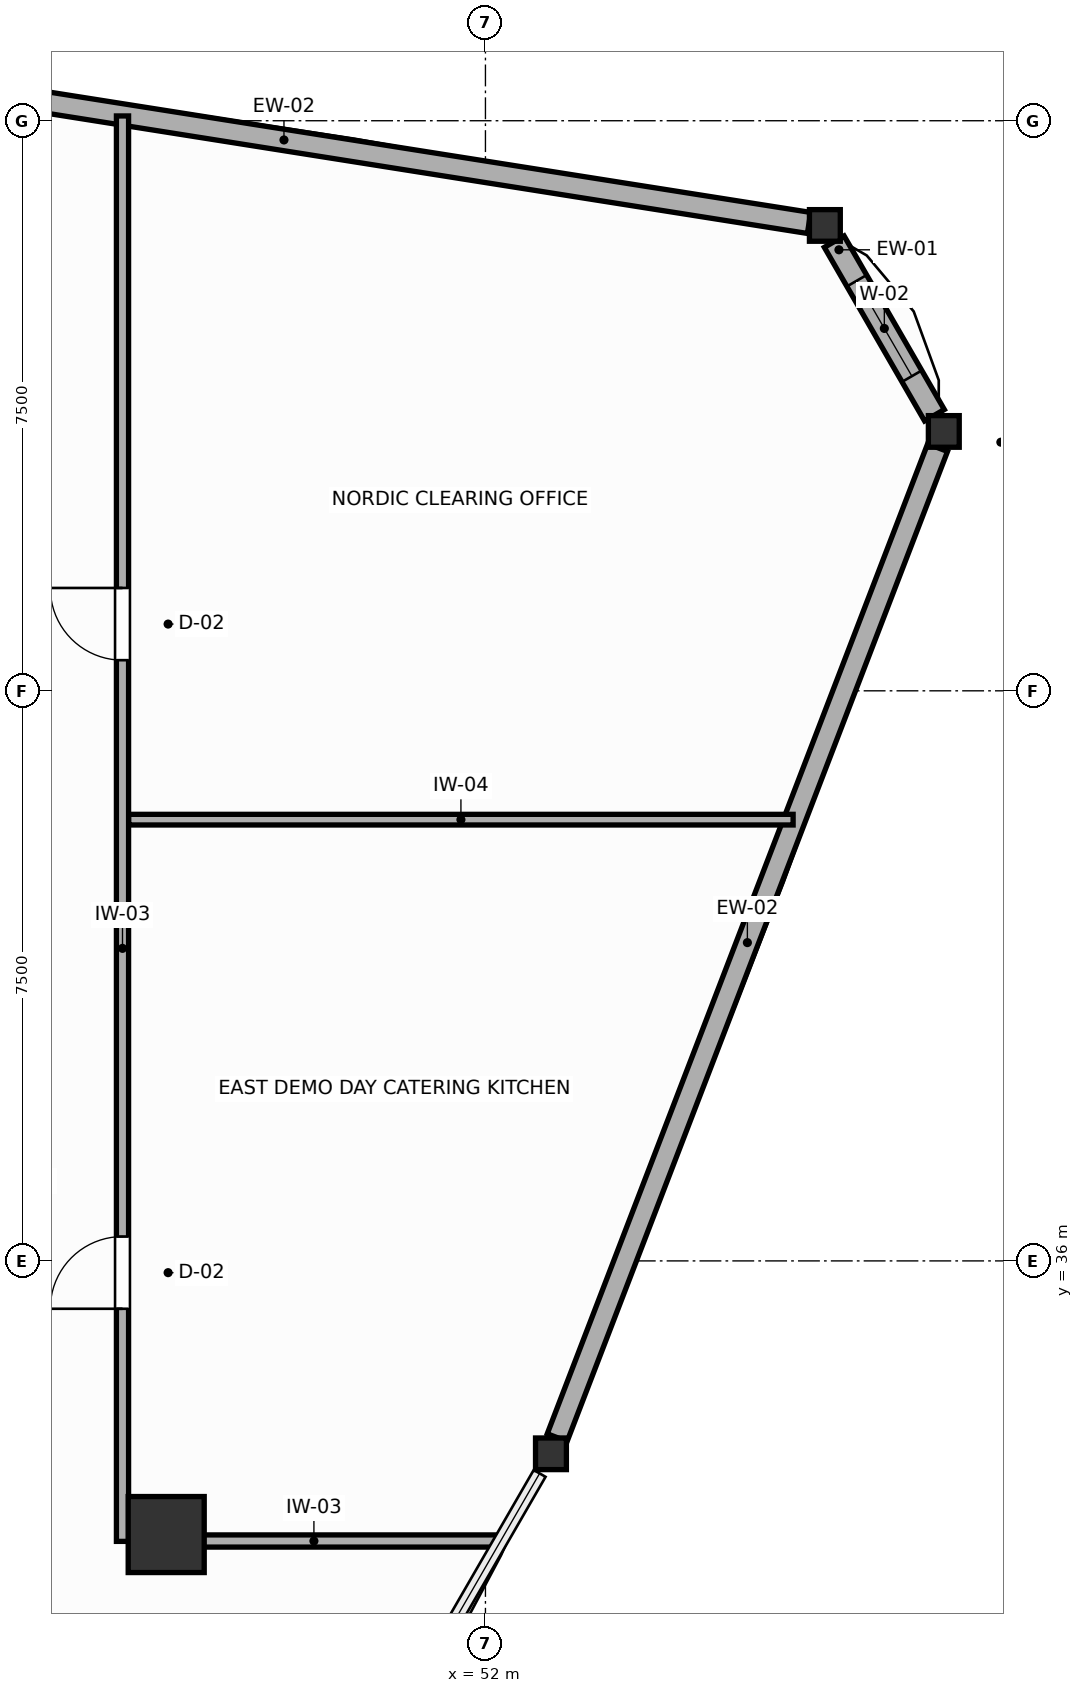
"""IFC4 building model, lengths in metres.
Left out: names, types, materials, properties, quantities, classifications, styles, units other than length and angle.
Written with IfcOpenShell. Run it as: python <this file> out.ifc"""

import sys

from ifc_helpers import new_model, si_unit, direction, frame, frame_2d, origin, origin_2d, place, context, subcontext, project, spatial, rectangle, i_section, extrude, source, transform, mapped, element, fill, save


model = new_model("IFC4")
c1 = context("Model", 3, precision=1e-05, world=origin(), true_north=direction((0.0, 1.0)))
c2 = subcontext(c1, "Body", "Model", "MODEL_VIEW")
j1 = project(units=[si_unit("LENGTHUNIT", "METRE"), si_unit("PLANEANGLEUNIT", "RADIAN")], contexts=[c1])
p1 = place(None, origin())
s1 = spatial("IfcSite", under=j1, at=p1, CompositionType="ELEMENT")
p2 = place(p1, origin())
s2 = spatial("IfcBuilding", under=s1, at=p2, CompositionType="ELEMENT")
p3 = place(p2, frame((0.0, 0.0, 197.4)))
s3 = spatial("IfcBuildingStorey", under=s2, at=p3, CompositionType="ELEMENT", Elevation=197.4)
m1 = source(origin(), c2, "Body", "SweptSolid", [
    extrude(rectangle(XDim=1.0, YDim=1.0, at=origin_2d()), origin(), (0.0, 0.0, 1.0), 3.6),
])
p4 = place(p3, frame((47.8, 32.4, 0.0), z_axis=(0.0, 0.0, 1.0), x_axis=(1.0, 0.0, 0.0)))
e1 = element("IfcColumn", 1, at=p4, inside=s3, PredefinedType="COLUMN", context=c2, shape_type="MappedRepresentation", body=[
    mapped(m1, transform((0.0, 0.0, 0.0), scale=1.0)),
])
m2 = source(origin(), c2, "Body", "SweptSolid", [
    extrude(i_section(OverallWidth=0.406, OverallDepth=0.416, WebThickness=0.027, FlangeThickness=0.044, FilletRadius=0.015, at=origin_2d()), origin(), (0.0, 0.0, 1.0), 3.6),
])
for number, where, z_axis, x_axis in (
    (2, (58.03, 46.912, 0.0), (0.0, 0.0, 1.0), (1.0, 0.0, 0.0)),
    (3, (56.466, 49.623, 0.0), (0.0, 0.0, 1.0), (1.0, 0.0, 0.0)),
    (4, (52.862, 33.462, 0.0), (0.0, 0.0, 1.0), (1.0, 0.0, 0.0)),
):
    element("IfcColumn", number, at=place(p3, frame(where, z_axis=z_axis, x_axis=x_axis)), inside=s3, PredefinedType="COLUMN", context=c2, shape_type="MappedRepresentation", body=[
        mapped(m2, transform((0.0, 0.0, 0.0), scale=1.0)),
    ])
p5 = place(p3, frame((57.907, 47.125, 0.0), z_axis=(0.0, 0.0, 1.0), x_axis=(-0.500061666259, 0.865989797826, 0.0)))
e5 = element("IfcWall", 5, at=p5, inside=s3, PredefinedType="SOLIDWALL", context=c2, shape_type="SweptSolid", body=[
    extrude(rectangle(XDim=2.637, YDim=0.3, at=frame_2d((1.319, 0.0))), origin(), (0.0, 0.0, 1.0), 2.87),
])
p6 = place(p5, frame((0.594, 0.0, 0.75)))
e6 = element("IfcOpeningElement", 6, at=p6, cuts=e5, PredefinedType="OPENING", context=c2, shape_type="SweptSolid", body=[
    extrude(rectangle(XDim=1.45, YDim=1.65, at=frame_2d((0.725, 0.825))), frame((0.0, 0.16, 0.0), z_axis=(0.0, -1.0, 0.0), x_axis=(1.0, 0.0, 0.0)), (0.0, 0.0, 1.0), 0.32),
])
p7 = place(p3, frame((56.258, 49.656, 0.0), z_axis=(0.0, 0.0, 1.0), x_axis=(-0.987743003355, 0.15608894683, 0.0)))
e7 = element("IfcWall", 7, at=p7, inside=s3, PredefinedType="SOLIDWALL", context=c2, shape_type="SweptSolid", body=[
    extrude(rectangle(XDim=13.988, YDim=0.28, at=frame_2d((6.994, 0.0))), origin(), (0.0, 0.0, 1.0), 2.87),
])
p8 = place(p3, frame((52.944, 33.675, 0.0), z_axis=(0.0, 0.0, 1.0), x_axis=(0.358703519473, 0.933451544065, 0.0)))
e8 = element("IfcWall", 8, at=p8, inside=s3, PredefinedType="SOLIDWALL", context=c2, shape_type="SweptSolid", body=[
    extrude(rectangle(XDim=13.953, YDim=0.28, at=frame_2d((6.976, 0.0))), origin(), (0.0, 0.0, 1.0), 2.87),
])
p9 = place(p3, frame((47.225, 32.31, 0.0), z_axis=(0.0, 0.0, 1.0), x_axis=(0.0, 1.0, 0.0)))
e9 = element("IfcWall", 9, at=p9, inside=s3, PredefinedType="PARTITIONING", context=c2, shape_type="SweptSolid", body=[
    extrude(rectangle(XDim=18.753, YDim=0.16, at=frame_2d((9.376, 0.0))), origin(), (0.0, 0.0, 1.0), 3.26),
])
p10 = place(p9, frame((3.06, 0.0, 0.0)))
e10 = element("IfcOpeningElement", 10, at=p10, cuts=e9, PredefinedType="OPENING", context=c2, shape_type="SweptSolid", body=[
    extrude(rectangle(XDim=0.95, YDim=2.05, at=frame_2d((0.475, 1.025))), frame((0.0, 0.09, 0.0), z_axis=(0.0, -1.0, 0.0), x_axis=(1.0, 0.0, 0.0)), (0.0, 0.0, 1.0), 0.18),
])
p11 = place(p9, frame((11.593, 0.0, 0.0)))
e11 = element("IfcOpeningElement", 11, at=p11, cuts=e9, PredefinedType="OPENING", context=c2, shape_type="SweptSolid", body=[
    extrude(rectangle(XDim=0.95, YDim=2.05, at=frame_2d((0.475, 1.025))), frame((0.0, 0.09, 0.0), z_axis=(0.0, -1.0, 0.0), x_axis=(1.0, 0.0, 0.0)), (0.0, 0.0, 1.0), 0.18),
])
p12 = place(p3, frame((47.307, 32.315, 0.0), z_axis=(0.0, 0.0, 1.0), x_axis=(1.0, 0.0, 0.0)))
e12 = element("IfcWall", 12, at=p12, inside=s3, PredefinedType="PARTITIONING", context=c2, shape_type="SweptSolid", body=[
    extrude(rectangle(XDim=4.873, YDim=0.16, at=frame_2d((2.437, 0.0))), origin(), (0.0, 0.0, 1.0), 2.81),
])
p13 = place(p3, frame((47.307, 41.805, 0.0), z_axis=(0.0, 0.0, 1.0), x_axis=(1.0, 0.0, 0.0)))
e13 = element("IfcWall", 13, at=p13, inside=s3, PredefinedType="PARTITIONING", context=c2, shape_type="SweptSolid", body=[
    extrude(rectangle(XDim=8.741, YDim=0.14, at=frame_2d((4.37, 0.0))), origin(), (0.0, 0.0, 1.0), 3.26),
])
p14 = place(p6, origin())
e14 = element("IfcWindow", 14, at=p14, inside=s3, PartitioningType="SINGLE_PANEL", PredefinedType="WINDOW", context=c2, shape_type="SweptSolid", body=[
    extrude(rectangle(XDim=1.45, YDim=1.65, at=frame_2d((0.725, 0.825))), frame((0.0, 0.03, 0.0), z_axis=(0.0, -1.0, 0.0), x_axis=(1.0, 0.0, 0.0)), (0.0, 0.0, 1.0), 0.06),
])
fill(e6, e14)
p15 = place(p10, origin())
e15 = element("IfcDoor", 15, at=p15, inside=s3, OperationType="SINGLE_SWING_LEFT", PredefinedType="DOOR", context=c2, shape_type="SweptSolid", body=[
    extrude(rectangle(XDim=0.95, YDim=2.05, at=frame_2d((0.475, 1.025))), frame((0.0, 0.025, 0.0), z_axis=(0.0, -1.0, 0.0), x_axis=(1.0, 0.0, 0.0)), (0.0, 0.0, 1.0), 0.05),
])
fill(e10, e15)
p16 = place(p11, origin())
e16 = element("IfcDoor", 16, at=p16, inside=s3, OperationType="SINGLE_SWING_RIGHT", PredefinedType="DOOR", context=c2, shape_type="SweptSolid", body=[
    extrude(rectangle(XDim=0.95, YDim=2.05, at=frame_2d((0.475, 1.025))), frame((0.0, 0.025, 0.0), z_axis=(0.0, -1.0, 0.0), x_axis=(1.0, 0.0, 0.0)), (0.0, 0.0, 1.0), 0.05),
])
fill(e11, e16)
save(model, sys.argv[1])
